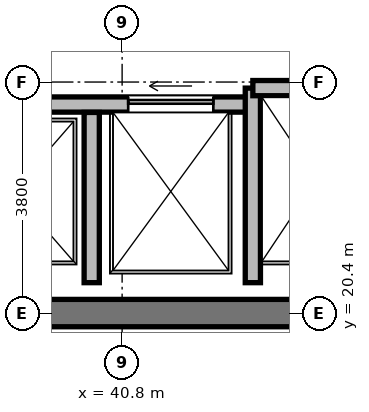
"""IFC4 building model, lengths in metres.
Left out: names, types, materials, properties, quantities, classifications, styles, units other than length and angle.
Written with IfcOpenShell. Run it as: python <this file> out.ifc"""

import sys

from ifc_helpers import new_model, si_unit, direction, frame, frame_2d, origin, place, context, subcontext, project, spatial, rectangle, extrude, element, fill, save


model = new_model("IFC4")
c1 = context("Model", 3, precision=1e-05, world=origin(), true_north=direction((0.0, 1.0)))
c2 = subcontext(c1, "Body", "Model", "MODEL_VIEW")
j1 = project(units=[si_unit("LENGTHUNIT", "METRE"), si_unit("PLANEANGLEUNIT", "RADIAN")], contexts=[c1])
p1 = place(None, origin())
s1 = spatial("IfcSite", under=j1, at=p1, CompositionType="ELEMENT")
p2 = place(p1, origin())
s2 = spatial("IfcBuilding", under=s1, at=p2, CompositionType="ELEMENT")
p3 = place(p2, frame((0.0, 0.0, 251.376)))
s3 = spatial("IfcBuildingStorey", under=s2, at=p3, CompositionType="ELEMENT", Elevation=251.376)
p4 = place(p3, frame((39.6, 20.4, 0.0), z_axis=(0.0, 0.0, 1.0), x_axis=(1.0, 0.0, 0.0)))
e1 = element("IfcWall", 1, at=p4, inside=s3, PredefinedType="SHEAR", context=c2, shape_type="SweptSolid", body=[
    extrude(rectangle(XDim=5.45, YDim=0.45, at=frame_2d((2.725, 0.0))), origin(), (0.0, 0.0, 1.0), 3.648),
])
p5 = place(p3, frame((26.75, 23.83, 0.0), z_axis=(0.0, 0.0, 1.0), x_axis=(1.0, 0.0, 0.0)))
e2 = element("IfcWall", 2, at=p5, inside=s3, PredefinedType="SOLIDWALL", context=c2, shape_type="SweptSolid", body=[
    extrude(rectangle(XDim=16.2, YDim=0.25, at=frame_2d((8.1, 0.0))), origin(), (0.0, 0.0, 1.0), 3.448),
])
p6 = place(p5, frame((4.75, 0.0, 0.0)))
e3 = element("IfcOpeningElement", 3, at=p6, cuts=e2, PredefinedType="OPENING", context=c2, shape_type="SweptSolid", body=[
    extrude(rectangle(XDim=1.4, YDim=2.2, at=frame_2d((0.7, 1.1))), frame((0.0, 0.135, 0.0), z_axis=(0.0, -1.0, 0.0), x_axis=(1.0, 0.0, 0.0)), (0.0, 0.0, 1.0), 0.27),
])
p7 = place(p5, frame((11.7, 0.0, 0.0)))
e4 = element("IfcOpeningElement", 4, at=p7, cuts=e2, PredefinedType="OPENING", context=c2, shape_type="SweptSolid", body=[
    extrude(rectangle(XDim=1.1, YDim=2.2, at=frame_2d((0.55, 1.1))), frame((0.0, 0.135, 0.0), z_axis=(0.0, -1.0, 0.0), x_axis=(1.0, 0.0, 0.0)), (0.0, 0.0, 1.0), 0.27),
])
p8 = place(p5, frame((14.15, 0.0, 0.0)))
e5 = element("IfcOpeningElement", 5, at=p8, cuts=e2, PredefinedType="OPENING", context=c2, shape_type="SweptSolid", body=[
    extrude(rectangle(XDim=1.4, YDim=2.3, at=frame_2d((0.7, 1.15))), frame((0.0, 0.135, 0.0), z_axis=(0.0, -1.0, 0.0), x_axis=(1.0, 0.0, 0.0)), (0.0, 0.0, 1.0), 0.27),
])
p9 = place(p3, frame((42.95, 20.9, 0.0), z_axis=(0.0, 0.0, 1.0), x_axis=(0.0, 1.0, 0.0)))
e6 = element("IfcWall", 6, at=p9, inside=s3, PredefinedType="SOLIDWALL", context=c2, shape_type="SweptSolid", body=[
    extrude(rectangle(XDim=3.2, YDim=0.25, at=frame_2d((1.6, 0.0))), origin(), (0.0, 0.0, 1.0), 3.448),
])
p10 = place(p3, frame((42.95, 24.1, 0.0), z_axis=(0.0, 0.0, 1.0), x_axis=(1.0, 0.0, 0.0)))
e7 = element("IfcWall", 7, at=p10, inside=s3, PredefinedType="SOLIDWALL", context=c2, shape_type="SweptSolid", body=[
    extrude(rectangle(XDim=2.3, YDim=0.25, at=frame_2d((1.15, 0.0))), origin(), (0.0, 0.0, 1.0), 3.448),
])
p11 = place(p3, frame((40.3, 20.9, 0.0), z_axis=(0.0, 0.0, 1.0), x_axis=(0.0, 1.0, 0.0)))
e8 = element("IfcWall", 8, at=p11, inside=s3, PredefinedType="SOLIDWALL", context=c2, shape_type="SweptSolid", body=[
    extrude(rectangle(XDim=2.8, YDim=0.25, at=frame_2d((1.4, 0.0))), origin(), (0.0, 0.0, 1.0), 3.448),
])
p12 = place(p8, origin())
e9 = element("IfcDoor", 9, at=p12, inside=s3, OperationType="SLIDING_TO_LEFT", PredefinedType="DOOR", context=c2, shape_type="SweptSolid", body=[
    extrude(rectangle(XDim=1.4, YDim=2.3, at=frame_2d((0.7, 1.15))), frame((0.0, 0.025, 0.0), z_axis=(0.0, -1.0, 0.0), x_axis=(1.0, 0.0, 0.0)), (0.0, 0.0, 1.0), 0.05),
])
fill(e5, e9)
save(model, sys.argv[1])
